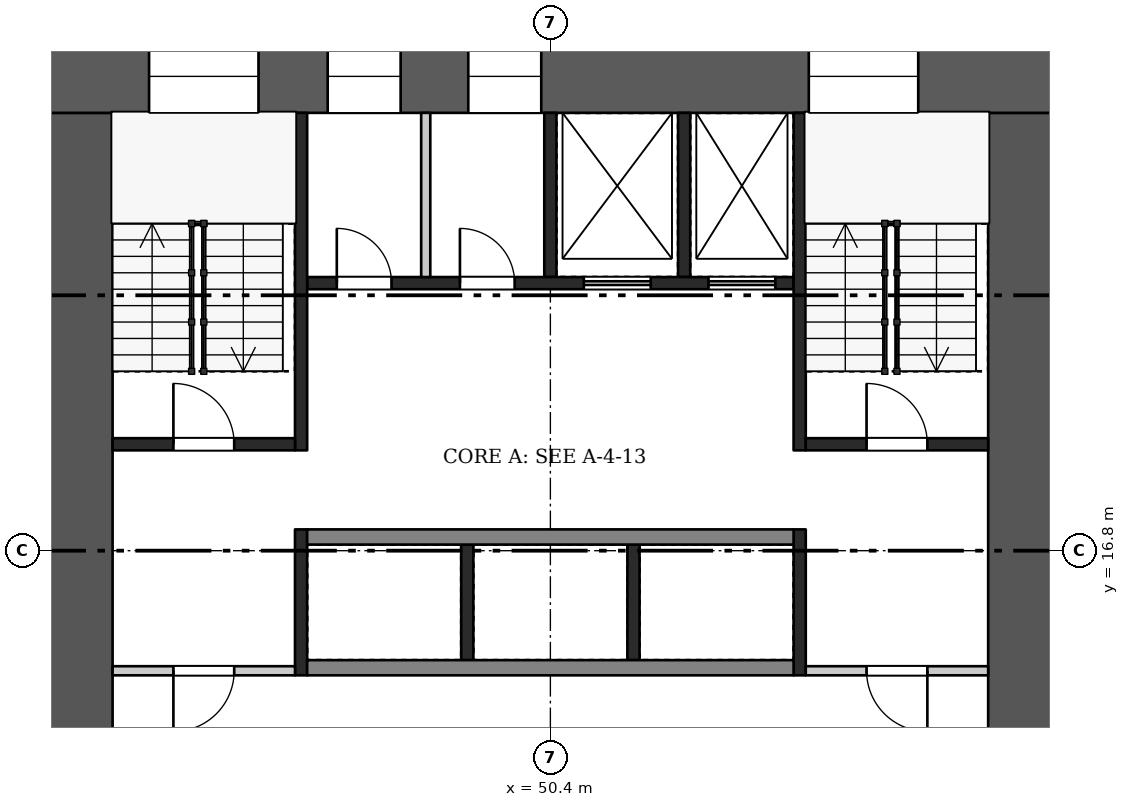
"""IFC4 building model, lengths in metres.
Left out: names, types, materials, properties, quantities, classifications, styles, units other than length and angle.
Written with IfcOpenShell. Run it as: python <this file> out.ifc"""

import sys

from ifc_helpers import new_model, si_unit, direction, frame, frame_2d, origin, place, context, subcontext, project, spatial, rectangle, extrude, element, fill, save


model = new_model("IFC4")
c1 = context("Model", 3, precision=1e-05, world=origin(), true_north=direction((0.0, 1.0)))
c2 = subcontext(c1, "Body", "Model", "MODEL_VIEW")
j1 = project(units=[si_unit("LENGTHUNIT", "METRE"), si_unit("PLANEANGLEUNIT", "RADIAN")], contexts=[c1])
p1 = place(None, origin())
s1 = spatial("IfcSite", under=j1, at=p1, CompositionType="ELEMENT")
p2 = place(p1, origin())
s2 = spatial("IfcBuilding", under=s1, at=p2, CompositionType="ELEMENT")
p3 = place(p2, frame((0.0, 0.0, 67.2)))
s3 = spatial("IfcBuildingStorey", under=s2, at=p3, CompositionType="ELEMENT", Elevation=67.2)
p4 = place(p3, frame((42.0, 24.6, 0.0), z_axis=(0.0, 0.0, 1.0), x_axis=(1.0, 0.0, 0.0)))
e1 = element("IfcWall", 1, at=p4, inside=s3, PredefinedType="SHEAR", context=c2, shape_type="SweptSolid", body=[
    extrude(rectangle(XDim=16.8, YDim=1.2, at=frame_2d((8.4, 0.0))), origin(), (0.0, 0.0, 1.0), 3.22),
])
p5 = place(p4, frame((1.8, 0.0, 0.5)))
e2 = element("IfcOpeningElement", 2, at=p5, cuts=e1, PredefinedType="OPENING", context=c2, shape_type="SweptSolid", body=[
    extrude(rectangle(XDim=1.8, YDim=2.4, at=frame_2d((0.9, 1.2))), frame((0.0, 0.61, 0.0), z_axis=(0.0, -1.0, 0.0), x_axis=(1.0, 0.0, 0.0)), (0.0, 0.0, 1.0), 1.22),
])
p6 = place(p4, frame((4.738, 0.0, 1.6)))
e3 = element("IfcOpeningElement", 3, at=p6, cuts=e1, PredefinedType="OPENING", context=c2, shape_type="SweptSolid", body=[
    extrude(rectangle(XDim=1.2, YDim=1.2, at=frame_2d((0.6, 0.6))), frame((0.0, 0.61, 0.0), z_axis=(0.0, -1.0, 0.0), x_axis=(1.0, 0.0, 0.0)), (0.0, 0.0, 1.0), 1.22),
])
p7 = place(p4, frame((7.05, 0.0, 1.6)))
e4 = element("IfcOpeningElement", 4, at=p7, cuts=e1, PredefinedType="OPENING", context=c2, shape_type="SweptSolid", body=[
    extrude(rectangle(XDim=1.2, YDim=1.2, at=frame_2d((0.6, 0.6))), frame((0.0, 0.61, 0.0), z_axis=(0.0, -1.0, 0.0), x_axis=(1.0, 0.0, 0.0)), (0.0, 0.0, 1.0), 1.22),
])
p8 = place(p4, frame((12.65, 0.0, 0.5)))
e5 = element("IfcOpeningElement", 5, at=p8, cuts=e1, PredefinedType="OPENING", context=c2, shape_type="SweptSolid", body=[
    extrude(rectangle(XDim=1.8, YDim=2.4, at=frame_2d((0.9, 1.2))), frame((0.0, 0.61, 0.0), z_axis=(0.0, -1.0, 0.0), x_axis=(1.0, 0.0, 0.0)), (0.0, 0.0, 1.0), 1.22),
])
p9 = place(p3, frame((42.6, 9.6, 0.0), z_axis=(0.0, 0.0, 1.0), x_axis=(0.0, 1.0, 0.0)))
e6 = element("IfcWall", 6, at=p9, inside=s3, PredefinedType="SHEAR", context=c2, shape_type="SweptSolid", body=[
    extrude(rectangle(XDim=14.4, YDim=1.2, at=frame_2d((7.2, 0.0))), origin(), (0.0, 0.0, 1.0), 3.22),
])
p10 = place(p9, frame((2.1, 0.0, 0.0)))
e7 = element("IfcOpeningElement", 7, at=p10, cuts=e6, PredefinedType="OPENING", context=c2, shape_type="SweptSolid", body=[
    extrude(rectangle(XDim=1.8, YDim=2.1, at=frame_2d((0.9, 1.05))), frame((0.0, 0.61, 0.0), z_axis=(0.0, -1.0, 0.0), x_axis=(1.0, 0.0, 0.0)), (0.0, 0.0, 1.0), 1.22),
])
p11 = place(p3, frame((58.2, 9.6, 0.0), z_axis=(0.0, 0.0, 1.0), x_axis=(0.0, 1.0, 0.0)))
e8 = element("IfcWall", 8, at=p11, inside=s3, PredefinedType="SHEAR", context=c2, shape_type="SweptSolid", body=[
    extrude(rectangle(XDim=14.4, YDim=1.2, at=frame_2d((7.2, 0.0))), origin(), (0.0, 0.0, 1.0), 3.22),
])
p12 = place(p11, frame((2.1, 0.0, 0.0)))
e9 = element("IfcOpeningElement", 9, at=p12, cuts=e8, PredefinedType="OPENING", context=c2, shape_type="SweptSolid", body=[
    extrude(rectangle(XDim=1.8, YDim=2.1, at=frame_2d((0.9, 1.05))), frame((0.0, 0.61, 0.0), z_axis=(0.0, -1.0, 0.0), x_axis=(1.0, 0.0, 0.0)), (0.0, 0.0, 1.0), 1.22),
])
for number, where, z_axis, x_axis in (
    (10, (49.033, 15.0, 0.0), (0.0, 0.0, 1.0), (0.0, 1.0, 0.0)),
    (11, (51.767, 15.0, 0.0), (0.0, 0.0, 1.0), (0.0, 1.0, 0.0)),
):
    element("IfcWall", number, at=place(p3, frame(where, z_axis=z_axis, x_axis=x_axis)), inside=s3, PredefinedType="SHEAR", context=c2, shape_type="SweptSolid", body=[
        extrude(rectangle(XDim=1.9, YDim=0.2, at=frame_2d((0.95, 0.0))), origin(), (0.0, 0.0, 1.0), 3.22),
    ])
for number, where, z_axis, x_axis in (
    (12, (46.4, 14.875, 0.0), (0.0, 0.0, 1.0), (1.0, 0.0, 0.0)),
    (13, (46.4, 17.025, 0.0), (0.0, 0.0, 1.0), (1.0, 0.0, 0.0)),
):
    element("IfcWall", number, at=place(p3, frame(where, z_axis=z_axis, x_axis=x_axis)), inside=s3, PredefinedType="SHEAR", context=c2, shape_type="SweptSolid", body=[
        extrude(rectangle(XDim=8.0, YDim=0.25, at=frame_2d((4.0, 0.0))), origin(), (0.0, 0.0, 1.0), 3.22),
    ])
for number, where, z_axis, x_axis in (
    (14, (50.4, 21.3, 0.0), (0.0, 0.0, 1.0), (0.0, 1.0, 0.0)),
    (15, (52.6, 21.3, 0.0), (0.0, 0.0, 1.0), (0.0, 1.0, 0.0)),
):
    element("IfcWall", number, at=place(p3, frame(where, z_axis=z_axis, x_axis=x_axis)), inside=s3, PredefinedType="SHEAR", context=c2, shape_type="SweptSolid", body=[
        extrude(rectangle(XDim=2.7, YDim=0.2, at=frame_2d((1.35, 0.0))), origin(), (0.0, 0.0, 1.0), 3.22),
    ])
p13 = place(p3, frame((48.35, 21.3, 0.0), z_axis=(0.0, 0.0, 1.0), x_axis=(0.0, 1.0, 0.0)))
e16 = element("IfcWall", 16, at=p13, inside=s3, PredefinedType="PARTITIONING", context=c2, shape_type="SweptSolid", body=[
    extrude(rectangle(XDim=2.7, YDim=0.15, at=frame_2d((1.35, 0.0))), origin(), (0.0, 0.0, 1.0), 3.22),
])
p14 = place(p3, frame((46.4, 21.2, 0.0), z_axis=(0.0, 0.0, 1.0), x_axis=(1.0, 0.0, 0.0)))
e17 = element("IfcWall", 17, at=p14, inside=s3, PredefinedType="SHEAR", context=c2, shape_type="SweptSolid", body=[
    extrude(rectangle(XDim=8.0, YDim=0.2, at=frame_2d((4.0, 0.0))), origin(), (0.0, 0.0, 1.0), 3.22),
])
p15 = place(p14, frame((0.488, 0.0, 0.0)))
e18 = element("IfcOpeningElement", 18, at=p15, cuts=e17, PredefinedType="OPENING", context=c2, shape_type="SweptSolid", body=[
    extrude(rectangle(XDim=0.9, YDim=2.1, at=frame_2d((0.45, 1.05))), frame((0.0, 0.11, 0.0), z_axis=(0.0, -1.0, 0.0), x_axis=(1.0, 0.0, 0.0)), (0.0, 0.0, 1.0), 0.22),
])
p16 = place(p14, frame((2.512, 0.0, 0.0)))
e19 = element("IfcOpeningElement", 19, at=p16, cuts=e17, PredefinedType="OPENING", context=c2, shape_type="SweptSolid", body=[
    extrude(rectangle(XDim=0.9, YDim=2.1, at=frame_2d((0.45, 1.05))), frame((0.0, 0.11, 0.0), z_axis=(0.0, -1.0, 0.0), x_axis=(1.0, 0.0, 0.0)), (0.0, 0.0, 1.0), 0.22),
])
p17 = place(p14, frame((4.55, 0.0, 0.0)))
e20 = element("IfcOpeningElement", 20, at=p17, cuts=e17, PredefinedType="OPENING", context=c2, shape_type="SweptSolid", body=[
    extrude(rectangle(XDim=1.1, YDim=2.1, at=frame_2d((0.55, 1.05))), frame((0.0, 0.11, 0.0), z_axis=(0.0, -1.0, 0.0), x_axis=(1.0, 0.0, 0.0)), (0.0, 0.0, 1.0), 0.22),
])
p18 = place(p14, frame((6.6, 0.0, 0.0)))
e21 = element("IfcOpeningElement", 21, at=p18, cuts=e17, PredefinedType="OPENING", context=c2, shape_type="SweptSolid", body=[
    extrude(rectangle(XDim=1.1, YDim=2.1, at=frame_2d((0.55, 1.05))), frame((0.0, 0.11, 0.0), z_axis=(0.0, -1.0, 0.0), x_axis=(1.0, 0.0, 0.0)), (0.0, 0.0, 1.0), 0.22),
])
p19 = place(p3, frame((46.3, 14.75, 0.0), z_axis=(0.0, 0.0, 1.0), x_axis=(0.0, 1.0, 0.0)))
e22 = element("IfcWall", 22, at=p19, inside=s3, PredefinedType="SHEAR", context=c2, shape_type="SweptSolid", body=[
    extrude(rectangle(XDim=2.4, YDim=0.2, at=frame_2d((1.2, 0.0))), origin(), (0.0, 0.0, 1.0), 3.22),
])
p20 = place(p3, frame((46.3, 18.45, 0.0), z_axis=(0.0, 0.0, 1.0), x_axis=(0.0, 1.0, 0.0)))
e23 = element("IfcWall", 23, at=p20, inside=s3, PredefinedType="SHEAR", context=c2, shape_type="SweptSolid", body=[
    extrude(rectangle(XDim=5.55, YDim=0.2, at=frame_2d((2.775, 0.0))), origin(), (0.0, 0.0, 1.0), 3.22),
])
p21 = place(p3, frame((43.2, 14.825, 0.0), z_axis=(0.0, 0.0, 1.0), x_axis=(1.0, 0.0, 0.0)))
e24 = element("IfcWall", 24, at=p21, inside=s3, PredefinedType="PARTITIONING", context=c2, shape_type="SweptSolid", body=[
    extrude(rectangle(XDim=3.0, YDim=0.15, at=frame_2d((1.5, 0.0))), origin(), (0.0, 0.0, 1.0), 3.22),
])
p22 = place(p21, frame((1.0, 0.0, 0.0)))
e25 = element("IfcOpeningElement", 25, at=p22, cuts=e24, PredefinedType="OPENING", context=c2, shape_type="SweptSolid", body=[
    extrude(rectangle(XDim=1.0, YDim=2.1, at=frame_2d((0.5, 1.05))), frame((0.0, 0.085, 0.0), z_axis=(0.0, -1.0, 0.0), x_axis=(1.0, 0.0, 0.0)), (0.0, 0.0, 1.0), 0.17),
])
p23 = place(p3, frame((43.2, 18.55, 0.0), z_axis=(0.0, 0.0, 1.0), x_axis=(1.0, 0.0, 0.0)))
e26 = element("IfcWall", 26, at=p23, inside=s3, PredefinedType="SHEAR", context=c2, shape_type="SweptSolid", body=[
    extrude(rectangle(XDim=3.0, YDim=0.2, at=frame_2d((1.5, 0.0))), origin(), (0.0, 0.0, 1.0), 3.22),
])
p24 = place(p23, frame((1.0, 0.0, 0.0)))
e27 = element("IfcOpeningElement", 27, at=p24, cuts=e26, PredefinedType="OPENING", context=c2, shape_type="SweptSolid", body=[
    extrude(rectangle(XDim=1.0, YDim=2.1, at=frame_2d((0.5, 1.05))), frame((0.0, 0.11, 0.0), z_axis=(0.0, -1.0, 0.0), x_axis=(1.0, 0.0, 0.0)), (0.0, 0.0, 1.0), 0.22),
])
p25 = place(p3, frame((54.5, 14.75, 0.0), z_axis=(0.0, 0.0, 1.0), x_axis=(0.0, 1.0, 0.0)))
e28 = element("IfcWall", 28, at=p25, inside=s3, PredefinedType="SHEAR", context=c2, shape_type="SweptSolid", body=[
    extrude(rectangle(XDim=2.4, YDim=0.2, at=frame_2d((1.2, 0.0))), origin(), (0.0, 0.0, 1.0), 3.22),
])
p26 = place(p3, frame((54.5, 18.45, 0.0), z_axis=(0.0, 0.0, 1.0), x_axis=(0.0, 1.0, 0.0)))
e29 = element("IfcWall", 29, at=p26, inside=s3, PredefinedType="SHEAR", context=c2, shape_type="SweptSolid", body=[
    extrude(rectangle(XDim=5.55, YDim=0.2, at=frame_2d((2.775, 0.0))), origin(), (0.0, 0.0, 1.0), 3.22),
])
p27 = place(p3, frame((54.6, 14.825, 0.0), z_axis=(0.0, 0.0, 1.0), x_axis=(1.0, 0.0, 0.0)))
e30 = element("IfcWall", 30, at=p27, inside=s3, PredefinedType="PARTITIONING", context=c2, shape_type="SweptSolid", body=[
    extrude(rectangle(XDim=3.0, YDim=0.15, at=frame_2d((1.5, 0.0))), origin(), (0.0, 0.0, 1.0), 3.22),
])
p28 = place(p27, frame((1.0, 0.0, 0.0)))
e31 = element("IfcOpeningElement", 31, at=p28, cuts=e30, PredefinedType="OPENING", context=c2, shape_type="SweptSolid", body=[
    extrude(rectangle(XDim=1.0, YDim=2.1, at=frame_2d((0.5, 1.05))), frame((0.0, 0.085, 0.0), z_axis=(0.0, -1.0, 0.0), x_axis=(1.0, 0.0, 0.0)), (0.0, 0.0, 1.0), 0.17),
])
p29 = place(p3, frame((54.6, 18.55, 0.0), z_axis=(0.0, 0.0, 1.0), x_axis=(1.0, 0.0, 0.0)))
e32 = element("IfcWall", 32, at=p29, inside=s3, PredefinedType="SHEAR", context=c2, shape_type="SweptSolid", body=[
    extrude(rectangle(XDim=3.0, YDim=0.2, at=frame_2d((1.5, 0.0))), origin(), (0.0, 0.0, 1.0), 3.22),
])
p30 = place(p29, frame((1.0, 0.0, 0.0)))
e33 = element("IfcOpeningElement", 33, at=p30, cuts=e32, PredefinedType="OPENING", context=c2, shape_type="SweptSolid", body=[
    extrude(rectangle(XDim=1.0, YDim=2.1, at=frame_2d((0.5, 1.05))), frame((0.0, 0.11, 0.0), z_axis=(0.0, -1.0, 0.0), x_axis=(1.0, 0.0, 0.0)), (0.0, 0.0, 1.0), 0.22),
])
p31 = place(p15, origin())
e34 = element("IfcDoor", 34, at=p31, inside=s3, OperationType="SINGLE_SWING_LEFT", PredefinedType="DOOR", context=c2, shape_type="SweptSolid", body=[
    extrude(rectangle(XDim=0.9, YDim=2.1, at=frame_2d((0.45, 1.05))), frame((0.0, 0.025, 0.0), z_axis=(0.0, -1.0, 0.0), x_axis=(1.0, 0.0, 0.0)), (0.0, 0.0, 1.0), 0.05),
])
fill(e18, e34)
p32 = place(p16, origin())
e35 = element("IfcDoor", 35, at=p32, inside=s3, OperationType="SINGLE_SWING_LEFT", PredefinedType="DOOR", context=c2, shape_type="SweptSolid", body=[
    extrude(rectangle(XDim=0.9, YDim=2.1, at=frame_2d((0.45, 1.05))), frame((0.0, 0.025, 0.0), z_axis=(0.0, -1.0, 0.0), x_axis=(1.0, 0.0, 0.0)), (0.0, 0.0, 1.0), 0.05),
])
fill(e19, e35)
p33 = place(p17, origin())
e36 = element("IfcDoor", 36, at=p33, inside=s3, OperationType="DOUBLE_DOOR_SLIDING", PredefinedType="DOOR", context=c2, shape_type="SweptSolid", body=[
    extrude(rectangle(XDim=1.1, YDim=2.1, at=frame_2d((0.55, 1.05))), frame((0.0, 0.025, 0.0), z_axis=(0.0, -1.0, 0.0), x_axis=(1.0, 0.0, 0.0)), (0.0, 0.0, 1.0), 0.05),
])
fill(e20, e36)
p34 = place(p18, origin())
e37 = element("IfcDoor", 37, at=p34, inside=s3, OperationType="DOUBLE_DOOR_SLIDING", PredefinedType="DOOR", context=c2, shape_type="SweptSolid", body=[
    extrude(rectangle(XDim=1.1, YDim=2.1, at=frame_2d((0.55, 1.05))), frame((0.0, 0.025, 0.0), z_axis=(0.0, -1.0, 0.0), x_axis=(1.0, 0.0, 0.0)), (0.0, 0.0, 1.0), 0.05),
])
fill(e21, e37)
p35 = place(p22, frame((1.0, 0.0, 0.0), z_axis=(0.0, 0.0, 1.0), x_axis=(-1.0, 0.0, 0.0)))
e38 = element("IfcDoor", 38, at=p35, inside=s3, OperationType="SINGLE_SWING_RIGHT", PredefinedType="DOOR", context=c2, shape_type="SweptSolid", body=[
    extrude(rectangle(XDim=1.0, YDim=2.1, at=frame_2d((0.5, 1.05))), frame((0.0, 0.025, 0.0), z_axis=(0.0, -1.0, 0.0), x_axis=(1.0, 0.0, 0.0)), (0.0, 0.0, 1.0), 0.05),
])
fill(e25, e38)
p36 = place(p24, origin())
e39 = element("IfcDoor", 39, at=p36, inside=s3, OperationType="SINGLE_SWING_LEFT", PredefinedType="DOOR", context=c2, shape_type="SweptSolid", body=[
    extrude(rectangle(XDim=1.0, YDim=2.1, at=frame_2d((0.5, 1.05))), frame((0.0, 0.025, 0.0), z_axis=(0.0, -1.0, 0.0), x_axis=(1.0, 0.0, 0.0)), (0.0, 0.0, 1.0), 0.05),
])
fill(e27, e39)
p37 = place(p28, frame((1.0, 0.0, 0.0), z_axis=(0.0, 0.0, 1.0), x_axis=(-1.0, 0.0, 0.0)))
e40 = element("IfcDoor", 40, at=p37, inside=s3, OperationType="SINGLE_SWING_LEFT", PredefinedType="DOOR", context=c2, shape_type="SweptSolid", body=[
    extrude(rectangle(XDim=1.0, YDim=2.1, at=frame_2d((0.5, 1.05))), frame((0.0, 0.025, 0.0), z_axis=(0.0, -1.0, 0.0), x_axis=(1.0, 0.0, 0.0)), (0.0, 0.0, 1.0), 0.05),
])
fill(e31, e40)
p38 = place(p30, origin())
e41 = element("IfcDoor", 41, at=p38, inside=s3, OperationType="SINGLE_SWING_LEFT", PredefinedType="DOOR", context=c2, shape_type="SweptSolid", body=[
    extrude(rectangle(XDim=1.0, YDim=2.1, at=frame_2d((0.5, 1.05))), frame((0.0, 0.025, 0.0), z_axis=(0.0, -1.0, 0.0), x_axis=(1.0, 0.0, 0.0)), (0.0, 0.0, 1.0), 0.05),
])
fill(e33, e41)
p39 = place(p5, origin())
e42 = element("IfcWindow", 42, at=p39, inside=s3, PartitioningType="SINGLE_PANEL", PredefinedType="WINDOW", context=c2, shape_type="SweptSolid", body=[
    extrude(rectangle(XDim=1.8, YDim=2.4, at=frame_2d((0.9, 1.2))), frame((0.0, 0.03, 0.0), z_axis=(0.0, -1.0, 0.0), x_axis=(1.0, 0.0, 0.0)), (0.0, 0.0, 1.0), 0.06),
])
fill(e2, e42)
p40 = place(p6, origin())
e43 = element("IfcWindow", 43, at=p40, inside=s3, PartitioningType="SINGLE_PANEL", PredefinedType="WINDOW", context=c2, shape_type="SweptSolid", body=[
    extrude(rectangle(XDim=1.2, YDim=1.2, at=frame_2d((0.6, 0.6))), frame((0.0, 0.03, 0.0), z_axis=(0.0, -1.0, 0.0), x_axis=(1.0, 0.0, 0.0)), (0.0, 0.0, 1.0), 0.06),
])
fill(e3, e43)
p41 = place(p7, origin())
e44 = element("IfcWindow", 44, at=p41, inside=s3, PartitioningType="SINGLE_PANEL", PredefinedType="WINDOW", context=c2, shape_type="SweptSolid", body=[
    extrude(rectangle(XDim=1.2, YDim=1.2, at=frame_2d((0.6, 0.6))), frame((0.0, 0.03, 0.0), z_axis=(0.0, -1.0, 0.0), x_axis=(1.0, 0.0, 0.0)), (0.0, 0.0, 1.0), 0.06),
])
fill(e4, e44)
p42 = place(p8, origin())
e45 = element("IfcWindow", 45, at=p42, inside=s3, PartitioningType="SINGLE_PANEL", PredefinedType="WINDOW", context=c2, shape_type="SweptSolid", body=[
    extrude(rectangle(XDim=1.8, YDim=2.4, at=frame_2d((0.9, 1.2))), frame((0.0, 0.03, 0.0), z_axis=(0.0, -1.0, 0.0), x_axis=(1.0, 0.0, 0.0)), (0.0, 0.0, 1.0), 0.06),
])
fill(e5, e45)
save(model, sys.argv[1])
